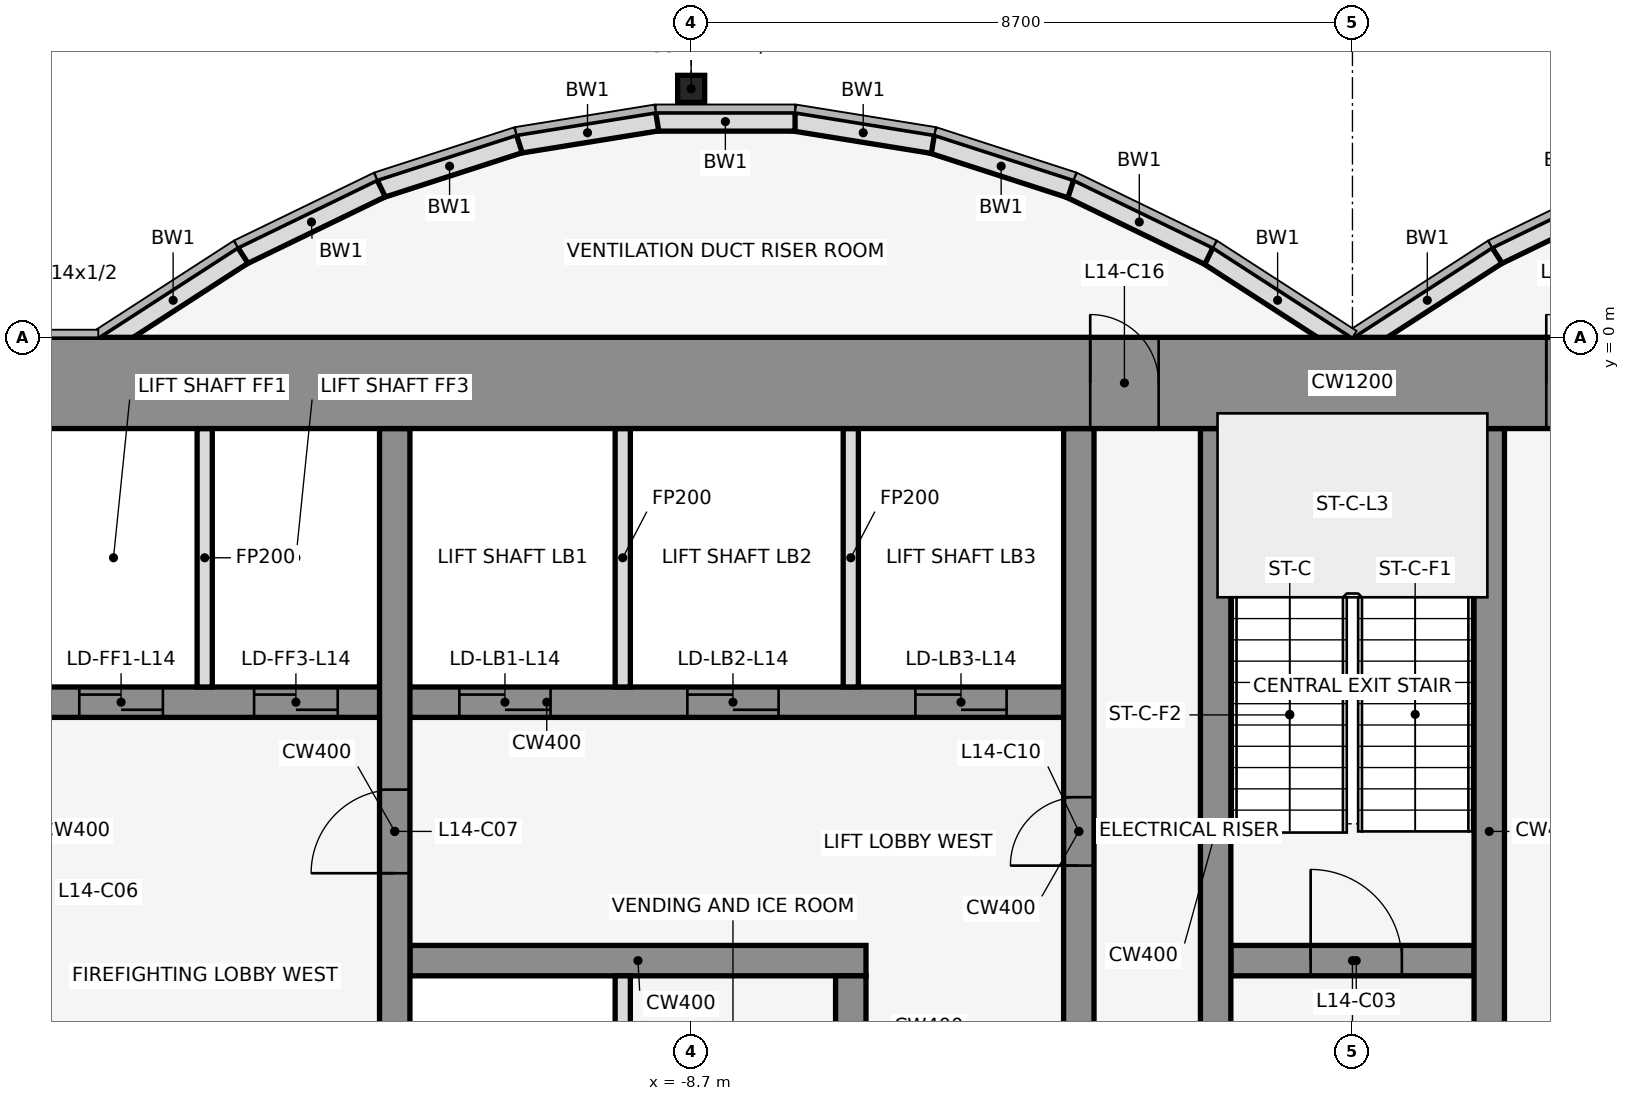
"""IFC4 building model, lengths in metres.
Left out: names, types, materials, properties, quantities, classifications, styles, units other than length and angle.
Written with IfcOpenShell. Run it as: python <this file> out.ifc"""

import sys

from ifc_helpers import new_model, si_unit, direction, frame, frame_2d, origin, origin_2d, place, context, subcontext, project, spatial, rectangle, hollow_rectangle, extrude, element, fill, save


model = new_model("IFC4")
c1 = context("Model", 3, precision=1e-05, world=origin(), true_north=direction((0.0, 1.0)))
c2 = subcontext(c1, "Body", "Model", "MODEL_VIEW")
j1 = project(units=[si_unit("LENGTHUNIT", "METRE"), si_unit("PLANEANGLEUNIT", "RADIAN")], contexts=[c1])
p1 = place(None, origin())
s1 = spatial("IfcSite", under=j1, at=p1, CompositionType="ELEMENT")
p2 = place(p1, origin())
s2 = spatial("IfcBuilding", under=s1, at=p2, CompositionType="ELEMENT")
p3 = place(p2, frame((0.0, 0.0, 71.0)))
s3 = spatial("IfcBuildingStorey", under=s2, at=p3, CompositionType="ELEMENT", Elevation=71.0)
p4 = place(p3, frame((-8.7, 3.269, 0.0), z_axis=(0.0, 0.0, 1.0), x_axis=(1.0, 0.0, 0.0)))
e1 = element("IfcColumn", 1, at=p4, inside=s3, PredefinedType="COLUMN", context=c2, shape_type="SweptSolid", body=[
    extrude(hollow_rectangle(XDim=0.356, YDim=0.356, WallThickness=0.012, at=origin_2d()), origin(), (0.0, 0.0, 1.0), 4.5),
])
p5 = place(p3, frame((3.721, 1.962, 0.0), z_axis=(0.0, 0.0, 1.0), x_axis=(-0.89982408427, -0.436252928206, 0.0)))
e2 = element("IfcWall", 2, at=p5, inside=s3, PredefinedType="STANDARD", context=c2, shape_type="SweptSolid", body=[
    extrude(rectangle(XDim=2.038, YDim=0.25, at=frame_2d((1.019, 0.0))), origin(), (0.0, 0.0, 1.0), 4.35),
])
for number, where, z_axis, x_axis in (
    (3, (1.901, 1.08, 0.0), (0.0, 0.0, 1.0), (-0.84, -0.543, 0.0)),
    (4, (-0.068, -0.105, 0.0), (0.0, 0.0, 1.0), (-0.84, 0.543, 0.0)),
):
    element("IfcWall", number, at=place(p3, frame(where, z_axis=z_axis, x_axis=x_axis)), inside=s3, PredefinedType="STANDARD", context=c2, shape_type="SweptSolid", body=[
        extrude(rectangle(XDim=2.183, YDim=0.25, at=frame_2d((1.091, 0.0))), origin(), (0.0, 0.0, 1.0), 4.35),
    ])
p6 = place(p3, frame((-1.888, 1.073, 0.0), z_axis=(0.0, 0.0, 1.0), x_axis=(-0.89982408427, 0.436252928206, 0.0)))
e5 = element("IfcWall", 5, at=p6, inside=s3, PredefinedType="STANDARD", context=c2, shape_type="SweptSolid", body=[
    extrude(rectangle(XDim=2.038, YDim=0.25, at=frame_2d((1.019, 0.0))), origin(), (0.0, 0.0, 1.0), 4.35),
])
p7 = place(p3, frame((-3.705, 1.955, 0.0), z_axis=(0.0, 0.0, 1.0), x_axis=(-0.951495806175, 0.307661714928, 0.0)))
e6 = element("IfcWall", 6, at=p7, inside=s3, PredefinedType="STANDARD", context=c2, shape_type="SweptSolid", body=[
    extrude(rectangle(XDim=1.927, YDim=0.25, at=frame_2d((0.963, 0.0))), origin(), (0.0, 0.0, 1.0), 4.35),
])
p8 = place(p3, frame((-5.52, 2.543, 0.0), z_axis=(0.0, 0.0, 1.0), x_axis=(-0.987181718931, 0.159600293885, 0.0)))
e7 = element("IfcWall", 7, at=p8, inside=s3, PredefinedType="STANDARD", context=c2, shape_type="SweptSolid", body=[
    extrude(rectangle(XDim=1.857, YDim=0.25, at=frame_2d((0.929, 0.0))), origin(), (0.0, 0.0, 1.0), 4.35),
])
p9 = place(p3, frame((-7.333, 2.838, 0.0), z_axis=(0.0, 0.0, 1.0), x_axis=(-1.0, 0.0, 0.0)))
e8 = element("IfcWall", 8, at=p9, inside=s3, PredefinedType="STANDARD", context=c2, shape_type="SweptSolid", body=[
    extrude(rectangle(XDim=1.833, YDim=0.25, at=frame_2d((0.917, 0.0))), origin(), (0.0, 0.0, 1.0), 4.35),
])
p10 = place(p3, frame((-9.147, 2.84, 0.0), z_axis=(0.0, 0.0, 1.0), x_axis=(-0.987181718931, -0.159600293885, 0.0)))
e9 = element("IfcWall", 9, at=p10, inside=s3, PredefinedType="STANDARD", context=c2, shape_type="SweptSolid", body=[
    extrude(rectangle(XDim=1.857, YDim=0.25, at=frame_2d((0.929, 0.0))), origin(), (0.0, 0.0, 1.0), 4.35),
])
p11 = place(p3, frame((-10.962, 2.548, 0.0), z_axis=(0.0, 0.0, 1.0), x_axis=(-0.951495806175, -0.307661714928, 0.0)))
e10 = element("IfcWall", 10, at=p11, inside=s3, PredefinedType="STANDARD", context=c2, shape_type="SweptSolid", body=[
    extrude(rectangle(XDim=1.927, YDim=0.25, at=frame_2d((0.963, 0.0))), origin(), (0.0, 0.0, 1.0), 4.35),
])
p12 = place(p3, frame((-12.779, 1.962, 0.0), z_axis=(0.0, 0.0, 1.0), x_axis=(-0.89982408427, -0.436252928206, 0.0)))
e11 = element("IfcWall", 11, at=p12, inside=s3, PredefinedType="STANDARD", context=c2, shape_type="SweptSolid", body=[
    extrude(rectangle(XDim=2.038, YDim=0.25, at=frame_2d((1.019, 0.0))), origin(), (0.0, 0.0, 1.0), 4.35),
])
p13 = place(p3, frame((-14.599, 1.08, 0.0), z_axis=(0.0, 0.0, 1.0), x_axis=(-0.83981312244, -0.542875602121, 0.0)))
e12 = element("IfcWall", 12, at=p13, inside=s3, PredefinedType="STANDARD", context=c2, shape_type="SweptSolid", body=[
    extrude(rectangle(XDim=2.183, YDim=0.25, at=frame_2d((1.091, 0.0))), origin(), (0.0, 0.0, 1.0), 4.35),
])
p14 = place(p3, frame((-12.4, -8.2, 0.0), z_axis=(0.0, 0.0, 1.0), x_axis=(1.0, 0.0, 0.0)))
e13 = element("IfcWall", 13, at=p14, inside=s3, PredefinedType="SHEAR", context=c2, shape_type="SweptSolid", body=[
    extrude(rectangle(XDim=6.0, YDim=0.4, at=frame_2d((3.0, 0.0))), origin(), (0.0, 0.0, 1.0), 4.5),
])
p15 = place(p3, frame((-1.6, -8.2, 0.0), z_axis=(0.0, 0.0, 1.0), x_axis=(1.0, 0.0, 0.0)))
e14 = element("IfcWall", 14, at=p15, inside=s3, PredefinedType="SHEAR", context=c2, shape_type="SweptSolid", body=[
    extrude(rectangle(XDim=3.2, YDim=0.4, at=frame_2d((1.6, 0.0))), origin(), (0.0, 0.0, 1.0), 4.5),
])
p16 = place(p15, frame((1.05, 0.0, 0.0)))
e15 = element("IfcOpeningElement", 15, at=p16, cuts=e14, PredefinedType="OPENING", context=c2, shape_type="SweptSolid", body=[
    extrude(rectangle(XDim=1.2, YDim=2.1, at=frame_2d((0.6, 1.05))), frame((0.0, 0.212, 0.0), z_axis=(0.0, -1.0, 0.0), x_axis=(1.0, 0.0, 0.0)), (0.0, 0.0, 1.0), 0.424),
])
p17 = place(p3, frame((-17.4, -4.8, 0.0), z_axis=(0.0, 0.0, 1.0), x_axis=(1.0, 0.0, 0.0)))
e16 = element("IfcWall", 16, at=p17, inside=s3, PredefinedType="SHEAR", context=c2, shape_type="SweptSolid", body=[
    extrude(rectangle(XDim=13.6, YDim=0.4, at=frame_2d((6.8, 0.0))), origin(), (0.0, 0.0, 1.0), 4.5),
])
p18 = place(p17, frame((0.65, 0.0, 0.0)))
e17 = element("IfcOpeningElement", 17, at=p18, cuts=e16, PredefinedType="OPENING", context=c2, shape_type="SweptSolid", body=[
    extrude(rectangle(XDim=1.1, YDim=2.1, at=frame_2d((0.55, 1.05))), frame((0.0, 0.212, 0.0), z_axis=(0.0, -1.0, 0.0), x_axis=(1.0, 0.0, 0.0)), (0.0, 0.0, 1.0), 0.424),
])
p19 = place(p17, frame((2.95, 0.0, 0.0)))
e18 = element("IfcOpeningElement", 18, at=p19, cuts=e16, PredefinedType="OPENING", context=c2, shape_type="SweptSolid", body=[
    extrude(rectangle(XDim=1.1, YDim=2.1, at=frame_2d((0.55, 1.05))), frame((0.0, 0.212, 0.0), z_axis=(0.0, -1.0, 0.0), x_axis=(1.0, 0.0, 0.0)), (0.0, 0.0, 1.0), 0.424),
])
p20 = place(p17, frame((5.65, 0.0, 0.0)))
e19 = element("IfcOpeningElement", 19, at=p20, cuts=e16, PredefinedType="OPENING", context=c2, shape_type="SweptSolid", body=[
    extrude(rectangle(XDim=1.2, YDim=2.1, at=frame_2d((0.6, 1.05))), frame((0.0, 0.212, 0.0), z_axis=(0.0, -1.0, 0.0), x_axis=(1.0, 0.0, 0.0)), (0.0, 0.0, 1.0), 0.424),
])
p21 = place(p17, frame((8.65, 0.0, 0.0)))
e20 = element("IfcOpeningElement", 20, at=p21, cuts=e16, PredefinedType="OPENING", context=c2, shape_type="SweptSolid", body=[
    extrude(rectangle(XDim=1.2, YDim=2.1, at=frame_2d((0.6, 1.05))), frame((0.0, 0.212, 0.0), z_axis=(0.0, -1.0, 0.0), x_axis=(1.0, 0.0, 0.0)), (0.0, 0.0, 1.0), 0.424),
])
p22 = place(p17, frame((11.65, 0.0, 0.0)))
e21 = element("IfcOpeningElement", 21, at=p22, cuts=e16, PredefinedType="OPENING", context=c2, shape_type="SweptSolid", body=[
    extrude(rectangle(XDim=1.2, YDim=2.1, at=frame_2d((0.6, 1.05))), frame((0.0, 0.212, 0.0), z_axis=(0.0, -1.0, 0.0), x_axis=(1.0, 0.0, 0.0)), (0.0, 0.0, 1.0), 0.424),
])
p23 = place(p3, frame((-15.1, -4.6, 0.0), z_axis=(0.0, 0.0, 1.0), x_axis=(0.0, 1.0, 0.0)))
e22 = element("IfcWall", 22, at=p23, inside=s3, PredefinedType="PARTITIONING", context=c2, shape_type="SweptSolid", body=[
    extrude(rectangle(XDim=3.4, YDim=0.2, at=frame_2d((1.7, 0.0))), origin(), (0.0, 0.0, 1.0), 3.418),
])
p24 = place(p3, frame((-12.6, -11.8, 0.0), z_axis=(0.0, 0.0, 1.0), x_axis=(0.0, 1.0, 0.0)))
e23 = element("IfcWall", 23, at=p24, inside=s3, PredefinedType="SHEAR", context=c2, shape_type="SweptSolid", body=[
    extrude(rectangle(XDim=10.6, YDim=0.4, at=frame_2d((5.3, 0.0))), origin(), (0.0, 0.0, 1.0), 4.5),
])
p25 = place(p24, frame((4.75, 0.0, 0.0)))
e24 = element("IfcOpeningElement", 24, at=p25, cuts=e23, PredefinedType="OPENING", context=c2, shape_type="SweptSolid", body=[
    extrude(rectangle(XDim=1.1, YDim=2.1, at=frame_2d((0.55, 1.05))), frame((0.0, 0.212, 0.0), z_axis=(0.0, -1.0, 0.0), x_axis=(1.0, 0.0, 0.0)), (0.0, 0.0, 1.0), 0.424),
])
for number, where, z_axis, x_axis in (
    (25, (-9.6, -11.8, 0.0), (0.0, 0.0, 1.0), (0.0, 1.0, 0.0)),
    (26, (-9.6, -4.6, 0.0), (0.0, 0.0, 1.0), (0.0, 1.0, 0.0)),
):
    element("IfcWall", number, at=place(p3, frame(where, z_axis=z_axis, x_axis=x_axis)), inside=s3, PredefinedType="PARTITIONING", context=c2, shape_type="SweptSolid", body=[
        extrude(rectangle(XDim=3.4, YDim=0.2, at=frame_2d((1.7, 0.0))), origin(), (0.0, 0.0, 1.0), 3.418),
    ])
p26 = place(p3, frame((-6.6, -11.8, 0.0), z_axis=(0.0, 0.0, 1.0), x_axis=(0.0, 1.0, 0.0)))
e27 = element("IfcWall", 27, at=p26, inside=s3, PredefinedType="SHEAR", context=c2, shape_type="SweptSolid", body=[
    extrude(rectangle(XDim=3.4, YDim=0.4, at=frame_2d((1.7, 0.0))), origin(), (0.0, 0.0, 1.0), 4.5),
])
p27 = place(p26, frame((1.25, 0.0, 0.0)))
e28 = element("IfcOpeningElement", 28, at=p27, cuts=e27, PredefinedType="OPENING", context=c2, shape_type="SweptSolid", body=[
    extrude(rectangle(XDim=0.9, YDim=2.1, at=frame_2d((0.45, 1.05))), frame((0.0, 0.212, 0.0), z_axis=(0.0, -1.0, 0.0), x_axis=(1.0, 0.0, 0.0)), (0.0, 0.0, 1.0), 0.424),
])
p28 = place(p3, frame((-6.6, -4.6, 0.0), z_axis=(0.0, 0.0, 1.0), x_axis=(0.0, 1.0, 0.0)))
e29 = element("IfcWall", 29, at=p28, inside=s3, PredefinedType="PARTITIONING", context=c2, shape_type="SweptSolid", body=[
    extrude(rectangle(XDim=3.4, YDim=0.2, at=frame_2d((1.7, 0.0))), origin(), (0.0, 0.0, 1.0), 3.418),
])
p29 = place(p3, frame((-3.6, -11.8, 0.0), z_axis=(0.0, 0.0, 1.0), x_axis=(0.0, 1.0, 0.0)))
e30 = element("IfcWall", 30, at=p29, inside=s3, PredefinedType="SHEAR", context=c2, shape_type="SweptSolid", body=[
    extrude(rectangle(XDim=10.6, YDim=0.4, at=frame_2d((5.3, 0.0))), origin(), (0.0, 0.0, 1.0), 4.5),
])
p30 = place(p29, frame((4.85, 0.0, 0.0)))
e31 = element("IfcOpeningElement", 31, at=p30, cuts=e30, PredefinedType="OPENING", context=c2, shape_type="SweptSolid", body=[
    extrude(rectangle(XDim=0.9, YDim=2.1, at=frame_2d((0.45, 1.05))), frame((0.0, 0.212, 0.0), z_axis=(0.0, -1.0, 0.0), x_axis=(1.0, 0.0, 0.0)), (0.0, 0.0, 1.0), 0.424),
])
for number, where, z_axis, x_axis in (
    (32, (-1.8, -11.8, 0.0), (0.0, 0.0, 1.0), (0.0, 1.0, 0.0)),
    (33, (1.8, -11.8, 0.0), (0.0, 0.0, 1.0), (0.0, 1.0, 0.0)),
):
    element("IfcWall", number, at=place(p3, frame(where, z_axis=z_axis, x_axis=x_axis)), inside=s3, PredefinedType="SHEAR", context=c2, shape_type="SweptSolid", body=[
        extrude(rectangle(XDim=10.6, YDim=0.4, at=frame_2d((5.3, 0.0))), origin(), (0.0, 0.0, 1.0), 4.5),
    ])
p31 = place(p3, frame((-22.0, -0.6, 0.0), z_axis=(0.0, 0.0, 1.0), x_axis=(1.0, 0.0, 0.0)))
e34 = element("IfcWall", 34, at=p31, inside=s3, PredefinedType="SHEAR", context=c2, shape_type="SweptSolid", body=[
    extrude(rectangle(XDim=44.0, YDim=1.2, at=frame_2d((22.0, 0.0))), origin(), (0.0, 0.0, 1.0), 4.5),
])
p32 = place(p31, frame((18.55, 0.0, 0.0)))
e35 = element("IfcOpeningElement", 35, at=p32, cuts=e34, PredefinedType="OPENING", context=c2, shape_type="SweptSolid", body=[
    extrude(rectangle(XDim=0.9, YDim=2.1, at=frame_2d((0.45, 1.05))), frame((0.0, 0.612, 0.0), z_axis=(0.0, -1.0, 0.0), x_axis=(1.0, 0.0, 0.0)), (0.0, 0.0, 1.0), 1.224),
])
p33 = place(p31, frame((24.55, 0.0, 0.0)))
e36 = element("IfcOpeningElement", 36, at=p33, cuts=e34, PredefinedType="OPENING", context=c2, shape_type="SweptSolid", body=[
    extrude(rectangle(XDim=0.9, YDim=2.1, at=frame_2d((0.45, 1.05))), frame((0.0, 0.612, 0.0), z_axis=(0.0, -1.0, 0.0), x_axis=(1.0, 0.0, 0.0)), (0.0, 0.0, 1.0), 1.224),
])
p34 = place(p16, origin())
e37 = element("IfcDoor", 37, at=p34, inside=s3, OperationType="SINGLE_SWING_LEFT", PredefinedType="DOOR", context=c2, shape_type="SweptSolid", body=[
    extrude(rectangle(XDim=1.2, YDim=2.1, at=frame_2d((0.6, 1.05))), frame((0.0, 0.025, 0.0), z_axis=(0.0, -1.0, 0.0), x_axis=(1.0, 0.0, 0.0)), (0.0, 0.0, 1.0), 0.05),
])
fill(e15, e37)
p35 = place(p18, origin())
e38 = element("IfcDoor", 38, at=p35, inside=s3, OperationType="DOUBLE_DOOR_SLIDING", PredefinedType="DOOR", context=c2, shape_type="SweptSolid", body=[
    extrude(rectangle(XDim=1.1, YDim=2.1, at=frame_2d((0.55, 1.05))), frame((0.0, 0.025, 0.0), z_axis=(0.0, -1.0, 0.0), x_axis=(1.0, 0.0, 0.0)), (0.0, 0.0, 1.0), 0.05),
])
fill(e17, e38)
p36 = place(p19, origin())
e39 = element("IfcDoor", 39, at=p36, inside=s3, OperationType="DOUBLE_DOOR_SLIDING", PredefinedType="DOOR", context=c2, shape_type="SweptSolid", body=[
    extrude(rectangle(XDim=1.1, YDim=2.1, at=frame_2d((0.55, 1.05))), frame((0.0, 0.025, 0.0), z_axis=(0.0, -1.0, 0.0), x_axis=(1.0, 0.0, 0.0)), (0.0, 0.0, 1.0), 0.05),
])
fill(e18, e39)
p37 = place(p20, origin())
e40 = element("IfcDoor", 40, at=p37, inside=s3, OperationType="DOUBLE_DOOR_SLIDING", PredefinedType="DOOR", context=c2, shape_type="SweptSolid", body=[
    extrude(rectangle(XDim=1.2, YDim=2.1, at=frame_2d((0.6, 1.05))), frame((0.0, 0.025, 0.0), z_axis=(0.0, -1.0, 0.0), x_axis=(1.0, 0.0, 0.0)), (0.0, 0.0, 1.0), 0.05),
])
fill(e19, e40)
p38 = place(p21, origin())
e41 = element("IfcDoor", 41, at=p38, inside=s3, OperationType="DOUBLE_DOOR_SLIDING", PredefinedType="DOOR", context=c2, shape_type="SweptSolid", body=[
    extrude(rectangle(XDim=1.2, YDim=2.1, at=frame_2d((0.6, 1.05))), frame((0.0, 0.025, 0.0), z_axis=(0.0, -1.0, 0.0), x_axis=(1.0, 0.0, 0.0)), (0.0, 0.0, 1.0), 0.05),
])
fill(e20, e41)
p39 = place(p22, origin())
e42 = element("IfcDoor", 42, at=p39, inside=s3, OperationType="DOUBLE_DOOR_SLIDING", PredefinedType="DOOR", context=c2, shape_type="SweptSolid", body=[
    extrude(rectangle(XDim=1.2, YDim=2.1, at=frame_2d((0.6, 1.05))), frame((0.0, 0.025, 0.0), z_axis=(0.0, -1.0, 0.0), x_axis=(1.0, 0.0, 0.0)), (0.0, 0.0, 1.0), 0.05),
])
fill(e21, e42)
p40 = place(p25, origin())
e43 = element("IfcDoor", 43, at=p40, inside=s3, OperationType="SINGLE_SWING_LEFT", PredefinedType="DOOR", context=c2, shape_type="SweptSolid", body=[
    extrude(rectangle(XDim=1.1, YDim=2.1, at=frame_2d((0.55, 1.05))), frame((0.0, 0.025, 0.0), z_axis=(0.0, -1.0, 0.0), x_axis=(1.0, 0.0, 0.0)), (0.0, 0.0, 1.0), 0.05),
])
fill(e24, e43)
p41 = place(p30, frame((0.9, 0.0, 0.0), z_axis=(0.0, 0.0, 1.0), x_axis=(-1.0, 0.0, 0.0)))
e44 = element("IfcDoor", 44, at=p41, inside=s3, OperationType="SINGLE_SWING_LEFT", PredefinedType="DOOR", context=c2, shape_type="SweptSolid", body=[
    extrude(rectangle(XDim=0.9, YDim=2.1, at=frame_2d((0.45, 1.05))), frame((0.0, 0.025, 0.0), z_axis=(0.0, -1.0, 0.0), x_axis=(1.0, 0.0, 0.0)), (0.0, 0.0, 1.0), 0.05),
])
fill(e31, e44)
p42 = place(p32, origin())
e45 = element("IfcDoor", 45, at=p42, inside=s3, OperationType="SINGLE_SWING_LEFT", PredefinedType="DOOR", context=c2, shape_type="SweptSolid", body=[
    extrude(rectangle(XDim=0.9, YDim=2.1, at=frame_2d((0.45, 1.05))), frame((0.0, 0.025, 0.0), z_axis=(0.0, -1.0, 0.0), x_axis=(1.0, 0.0, 0.0)), (0.0, 0.0, 1.0), 0.05),
])
fill(e35, e45)
p43 = place(p33, origin())
e46 = element("IfcDoor", 46, at=p43, inside=s3, OperationType="SINGLE_SWING_LEFT", PredefinedType="DOOR", context=c2, shape_type="SweptSolid", body=[
    extrude(rectangle(XDim=0.9, YDim=2.1, at=frame_2d((0.45, 1.05))), frame((0.0, 0.025, 0.0), z_axis=(0.0, -1.0, 0.0), x_axis=(1.0, 0.0, 0.0)), (0.0, 0.0, 1.0), 0.05),
])
fill(e36, e46)
save(model, sys.argv[1])
